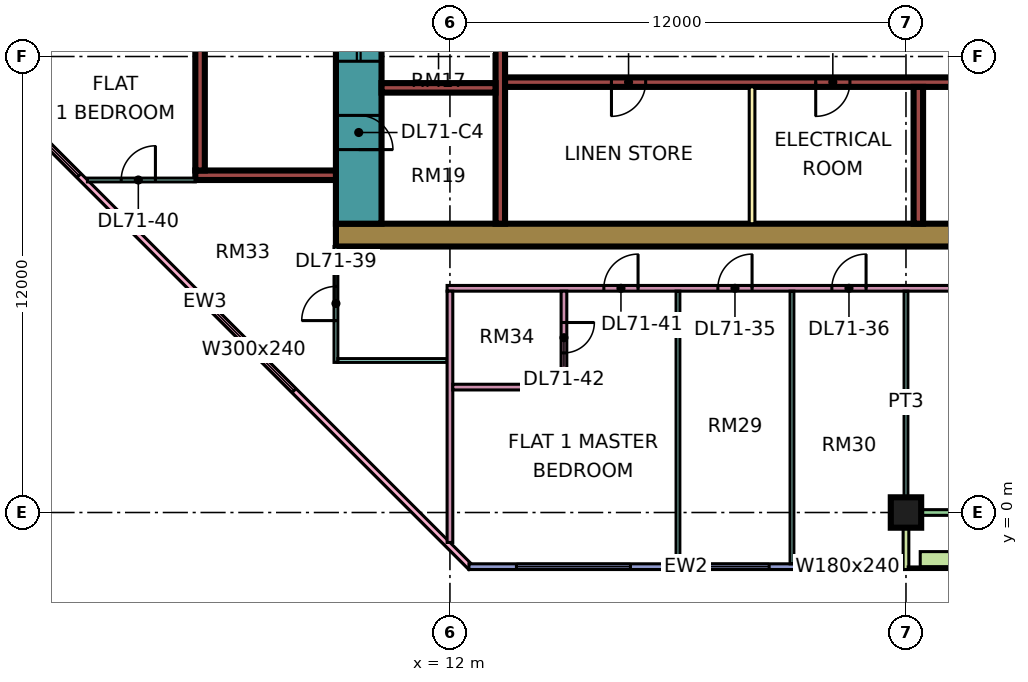
"""IFC4 building model, lengths in metres.
Left out: names, types, materials, properties, quantities, classifications, styles, units other than length and angle.
Written with IfcOpenShell. Run it as: python <this file> out.ifc"""

import sys

from ifc_helpers import new_model, si_unit, direction, frame, frame_2d, origin, origin_2d, place, context, subcontext, project, spatial, rectangle, extrude, element, fill, save


model = new_model("IFC4")
c1 = context("Model", 3, precision=1e-05, world=origin(), true_north=direction((0.0, 1.0)))
c2 = subcontext(c1, "Body", "Model", "MODEL_VIEW")
j1 = project(units=[si_unit("LENGTHUNIT", "METRE"), si_unit("PLANEANGLEUNIT", "RADIAN")], contexts=[c1])
p1 = place(None, origin())
s1 = spatial("IfcSite", under=j1, at=p1, CompositionType="ELEMENT")
p2 = place(p1, origin())
s2 = spatial("IfcBuilding", under=s1, at=p2, CompositionType="ELEMENT")
p3 = place(p2, frame((0.0, 0.0, 303.4)))
s3 = spatial("IfcBuildingStorey", under=s2, at=p3, CompositionType="ELEMENT", Elevation=303.4)
p4 = place(p3, frame((24.0, 0.0, 0.0), z_axis=(0.0, 0.0, 1.0), x_axis=(1.0, 0.0, 0.0)))
e1 = element("IfcColumn", 1, at=p4, inside=s3, PredefinedType="COLUMN", context=c2, shape_type="SweptSolid", body=[
    extrude(rectangle(XDim=0.8, YDim=0.8, at=origin_2d()), origin(), (0.0, 0.0, 1.0), 3.75),
])
p5 = place(p3, frame((9.0, 7.3, 0.0), z_axis=(0.0, 0.0, 1.0), x_axis=(1.0, 0.0, 0.0)))
e2 = element("IfcWall", 2, at=p5, inside=s3, PredefinedType="SHEAR", context=c2, shape_type="SweptSolid", body=[
    extrude(rectangle(XDim=25.0, YDim=0.6, at=frame_2d((12.5, 0.0))), origin(), (0.0, 0.0, 1.0), 3.75),
])
p6 = place(p3, frame((9.6, 7.6, 0.0), z_axis=(0.0, 0.0, 1.0), x_axis=(0.0, 1.0, 0.0)))
e3 = element("IfcWall", 3, at=p6, inside=s3, PredefinedType="SHEAR", context=c2, shape_type="SweptSolid", body=[
    extrude(rectangle(XDim=11.8, YDim=1.2, at=frame_2d((5.9, 0.0))), origin(), (0.0, 0.0, 1.0), 3.75),
])
p7 = place(p6, frame((4.275, 0.0, 0.0)))
e4 = element("IfcOpeningElement", 4, at=p7, cuts=e3, PredefinedType="OPENING", context=c2, shape_type="SweptSolid", body=[
    extrude(rectangle(XDim=1.1, YDim=2.2, at=frame_2d((0.55, 1.1))), frame((0.0, 0.61, 0.0), z_axis=(0.0, -1.0, 0.0), x_axis=(1.0, 0.0, 0.0)), (0.0, 0.0, 1.0), 1.22),
])
p8 = place(p6, frame((6.775, 0.0, 0.0)))
e5 = element("IfcOpeningElement", 5, at=p8, cuts=e3, PredefinedType="OPENING", context=c2, shape_type="SweptSolid", body=[
    extrude(rectangle(XDim=1.1, YDim=2.2, at=frame_2d((0.55, 1.1))), frame((0.0, 0.61, 0.0), z_axis=(0.0, -1.0, 0.0), x_axis=(1.0, 0.0, 0.0)), (0.0, 0.0, 1.0), 1.22),
])
p9 = place(p6, frame((9.7, 0.0, 0.0)))
e6 = element("IfcOpeningElement", 6, at=p9, cuts=e3, PredefinedType="OPENING", context=c2, shape_type="SweptSolid", body=[
    extrude(rectangle(XDim=1.1, YDim=2.2, at=frame_2d((0.55, 1.1))), frame((0.0, 0.61, 0.0), z_axis=(0.0, -1.0, 0.0), x_axis=(1.0, 0.0, 0.0)), (0.0, 0.0, 1.0), 1.22),
])
p10 = place(p6, frame((1.95, 0.0, 0.0)))
e7 = element("IfcOpeningElement", 7, at=p10, cuts=e3, PredefinedType="OPENING", context=c2, shape_type="SweptSolid", body=[
    extrude(rectangle(XDim=0.9, YDim=2.1, at=frame_2d((0.45, 1.05))), frame((0.0, 0.61, 0.0), z_axis=(0.0, -1.0, 0.0), x_axis=(1.0, 0.0, 0.0)), (0.0, 0.0, 1.0), 1.22),
])
p11 = place(p3, frame((13.325, 7.6, 0.0), z_axis=(0.0, 0.0, 1.0), x_axis=(0.0, 1.0, 0.0)))
e8 = element("IfcWall", 8, at=p11, inside=s3, PredefinedType="SHEAR", context=c2, shape_type="SweptSolid", body=[
    extrude(rectangle(XDim=11.8, YDim=0.25, at=frame_2d((5.9, 0.0))), origin(), (0.0, 0.0, 1.0), 3.75),
])
p12 = place(p3, frame((13.45, 11.325, 0.0), z_axis=(0.0, 0.0, 1.0), x_axis=(1.0, 0.0, 0.0)))
e9 = element("IfcWall", 9, at=p12, inside=s3, PredefinedType="SHEAR", context=c2, shape_type="SweptSolid", body=[
    extrude(rectangle(XDim=19.95, YDim=0.25, at=frame_2d((9.975, 0.0))), origin(), (0.0, 0.0, 1.0), 3.75),
])
p13 = place(p12, frame((2.8, 0.0, 0.0)))
e10 = element("IfcOpeningElement", 10, at=p13, cuts=e9, PredefinedType="OPENING", context=c2, shape_type="SweptSolid", body=[
    extrude(rectangle(XDim=0.9, YDim=2.1, at=frame_2d((0.45, 1.05))), frame((0.0, 0.135, 0.0), z_axis=(0.0, -1.0, 0.0), x_axis=(1.0, 0.0, 0.0)), (0.0, 0.0, 1.0), 0.27),
])
p14 = place(p12, frame((8.175, 0.0, 0.0)))
e11 = element("IfcOpeningElement", 11, at=p14, cuts=e9, PredefinedType="OPENING", context=c2, shape_type="SweptSolid", body=[
    extrude(rectangle(XDim=0.9, YDim=2.1, at=frame_2d((0.45, 1.05))), frame((0.0, 0.135, 0.0), z_axis=(0.0, -1.0, 0.0), x_axis=(1.0, 0.0, 0.0)), (0.0, 0.0, 1.0), 0.27),
])
p15 = place(p12, frame((13.175, 0.0, 0.0)))
e12 = element("IfcOpeningElement", 12, at=p15, cuts=e9, PredefinedType="OPENING", context=c2, shape_type="SweptSolid", body=[
    extrude(rectangle(XDim=0.9, YDim=2.1, at=frame_2d((0.45, 1.05))), frame((0.0, 0.135, 0.0), z_axis=(0.0, -1.0, 0.0), x_axis=(1.0, 0.0, 0.0)), (0.0, 0.0, 1.0), 0.27),
])
p16 = place(p12, frame((17.65, 0.0, 0.0)))
e13 = element("IfcOpeningElement", 13, at=p16, cuts=e9, PredefinedType="OPENING", context=c2, shape_type="SweptSolid", body=[
    extrude(rectangle(XDim=0.9, YDim=2.1, at=frame_2d((0.45, 1.05))), frame((0.0, 0.135, 0.0), z_axis=(0.0, -1.0, 0.0), x_axis=(1.0, 0.0, 0.0)), (0.0, 0.0, 1.0), 0.27),
])
p17 = place(p3, frame((10.2, 11.175, 0.0), z_axis=(0.0, 0.0, 1.0), x_axis=(1.0, 0.0, 0.0)))
e14 = element("IfcWall", 14, at=p17, inside=s3, PredefinedType="SHEAR", context=c2, shape_type="SweptSolid", body=[
    extrude(rectangle(XDim=3.0, YDim=0.25, at=frame_2d((1.5, 0.0))), origin(), (0.0, 0.0, 1.0), 3.75),
])
p18 = place(p3, frame((24.325, 7.6, 0.0), z_axis=(0.0, 0.0, 1.0), x_axis=(0.0, 1.0, 0.0)))
e15 = element("IfcWall", 15, at=p18, inside=s3, PredefinedType="SHEAR", context=c2, shape_type="SweptSolid", body=[
    extrude(rectangle(XDim=3.6, YDim=0.25, at=frame_2d((1.8, 0.0))), origin(), (0.0, 0.0, 1.0), 3.75),
])
p19 = place(p3, frame((5.3, 8.875, 0.0), z_axis=(0.0, 0.0, 1.0), x_axis=(1.0, 0.0, 0.0)))
e16 = element("IfcWall", 16, at=p19, inside=s3, PredefinedType="SHEAR", context=c2, shape_type="SweptSolid", body=[
    extrude(rectangle(XDim=3.7, YDim=0.25, at=frame_2d((1.85, 0.0))), origin(), (0.0, 0.0, 1.0), 3.75),
])
p20 = place(p3, frame((5.425, 9.0, 0.0), z_axis=(0.0, 0.0, 1.0), x_axis=(0.0, 1.0, 0.0)))
e17 = element("IfcWall", 17, at=p20, inside=s3, PredefinedType="SHEAR", context=c2, shape_type="SweptSolid", body=[
    extrude(rectangle(XDim=4.0, YDim=0.25, at=frame_2d((2.0, 0.0))), origin(), (0.0, 0.0, 1.0), 3.75),
])
p21 = place(p3, frame((-1.447, 12.553, 0.0), z_axis=(0.0, 0.0, 1.0), x_axis=(0.707106781187, -0.707106781187, 0.0)))
e18 = element("IfcWall", 18, at=p21, inside=s3, PredefinedType="SOLIDWALL", context=c2, shape_type="SweptSolid", body=[
    extrude(rectangle(XDim=19.799, YDim=0.15, at=frame_2d((9.899, 0.0))), origin(), (0.0, 0.0, 1.0), 3.35),
])
p22 = place(p21, frame((2.212, 0.0, 0.45)))
e19 = element("IfcOpeningElement", 19, at=p22, cuts=e18, PredefinedType="OPENING", context=c2, shape_type="SweptSolid", body=[
    extrude(rectangle(XDim=3.0, YDim=2.4, at=frame_2d((1.5, 1.2))), frame((0.0, 0.085, 0.0), z_axis=(0.0, -1.0, 0.0), x_axis=(1.0, 0.0, 0.0)), (0.0, 0.0, 1.0), 0.17),
])
p23 = place(p21, frame((10.216, 0.0, 0.45)))
e20 = element("IfcOpeningElement", 20, at=p23, cuts=e18, PredefinedType="OPENING", context=c2, shape_type="SweptSolid", body=[
    extrude(rectangle(XDim=3.0, YDim=2.4, at=frame_2d((1.5, 1.2))), frame((0.0, 0.085, 0.0), z_axis=(0.0, -1.0, 0.0), x_axis=(1.0, 0.0, 0.0)), (0.0, 0.0, 1.0), 0.17),
])
p24 = place(p3, frame((12.5, -1.425, 0.0), z_axis=(0.0, 0.0, 1.0), x_axis=(1.0, 0.0, 0.0)))
e21 = element("IfcWall", 21, at=p24, inside=s3, PredefinedType="SOLIDWALL", context=c2, shape_type="SweptSolid", body=[
    extrude(rectangle(XDim=11.425, YDim=0.15, at=frame_2d((5.712, 0.0))), origin(), (0.0, 0.0, 1.0), 3.35),
])
p25 = place(p24, frame((1.25, 0.0, 0.45)))
e22 = element("IfcOpeningElement", 22, at=p25, cuts=e21, PredefinedType="OPENING", context=c2, shape_type="SweptSolid", body=[
    extrude(rectangle(XDim=3.0, YDim=2.4, at=frame_2d((1.5, 1.2))), frame((0.0, 0.085, 0.0), z_axis=(0.0, -1.0, 0.0), x_axis=(1.0, 0.0, 0.0)), (0.0, 0.0, 1.0), 0.17),
])
p26 = place(p24, frame((6.1, 0.0, 0.45)))
e23 = element("IfcOpeningElement", 23, at=p26, cuts=e21, PredefinedType="OPENING", context=c2, shape_type="SweptSolid", body=[
    extrude(rectangle(XDim=1.8, YDim=2.4, at=frame_2d((0.9, 1.2))), frame((0.0, 0.085, 0.0), z_axis=(0.0, -1.0, 0.0), x_axis=(1.0, 0.0, 0.0)), (0.0, 0.0, 1.0), 0.17),
])
p27 = place(p24, frame((9.062, 0.0, 0.45)))
e24 = element("IfcOpeningElement", 24, at=p27, cuts=e21, PredefinedType="OPENING", context=c2, shape_type="SweptSolid", body=[
    extrude(rectangle(XDim=1.8, YDim=2.4, at=frame_2d((0.9, 1.2))), frame((0.0, 0.085, 0.0), z_axis=(0.0, -1.0, 0.0), x_axis=(1.0, 0.0, 0.0)), (0.0, 0.0, 1.0), 0.17),
])
p28 = place(p3, frame((24.075, 0.0, 0.0), z_axis=(0.0, 0.0, 1.0), x_axis=(1.0, 0.0, 0.0)))
e25 = element("IfcWall", 25, at=p28, inside=s3, PredefinedType="SOLIDWALL", context=c2, shape_type="SweptSolid", body=[
    extrude(rectangle(XDim=11.85, YDim=0.15, at=frame_2d((5.925, 0.0))), origin(), (0.0, 0.0, 1.0), 3.35),
])
p29 = place(p28, frame((3.775, 0.0, 0.0)))
e26 = element("IfcOpeningElement", 26, at=p29, cuts=e25, PredefinedType="OPENING", context=c2, shape_type="SweptSolid", body=[
    extrude(rectangle(XDim=1.8, YDim=2.4, at=frame_2d((0.9, 1.2))), frame((0.0, 0.085, 0.0), z_axis=(0.0, -1.0, 0.0), x_axis=(1.0, 0.0, 0.0)), (0.0, 0.0, 1.0), 0.17),
])
p30 = place(p28, frame((9.275, 0.0, 0.45)))
e27 = element("IfcOpeningElement", 27, at=p30, cuts=e25, PredefinedType="OPENING", context=c2, shape_type="SweptSolid", body=[
    extrude(rectangle(XDim=1.8, YDim=2.4, at=frame_2d((0.9, 1.2))), frame((0.0, 0.085, 0.0), z_axis=(0.0, -1.0, 0.0), x_axis=(1.0, 0.0, 0.0)), (0.0, 0.0, 1.0), 0.17),
])
p31 = place(p3, frame((24.0, -1.5, 0.0), z_axis=(0.0, 0.0, 1.0), x_axis=(0.0, 1.0, 0.0)))
e28 = element("IfcWall", 28, at=p31, inside=s3, PredefinedType="SOLIDWALL", context=c2, shape_type="SweptSolid", body=[
    extrude(rectangle(XDim=1.5, YDim=0.15, at=frame_2d((0.75, 0.0))), origin(), (0.0, 0.0, 1.0), 3.35),
])
p32 = place(p3, frame((24.375, -1.229, 0.0), z_axis=(0.0, 0.0, 1.0), x_axis=(1.0, 0.0, 0.0)))
e29 = element("IfcWall", 29, at=p32, inside=s3, PredefinedType="SOLIDWALL", context=c2, shape_type="SweptSolid", body=[
    extrude(rectangle(XDim=11.25, YDim=0.4, at=frame_2d((5.625, 0.0))), origin(), (0.0, 0.0, 1.0), 0.7),
])
p33 = place(p3, frame((19.95, 7.6, 0.0), z_axis=(0.0, 0.0, 1.0), x_axis=(0.0, 1.0, 0.0)))
e30 = element("IfcWall", 30, at=p33, inside=s3, PredefinedType="PARTITIONING", context=c2, shape_type="SweptSolid", body=[
    extrude(rectangle(XDim=3.6, YDim=0.15, at=frame_2d((1.8, 0.0))), origin(), (0.0, 0.0, 1.0), 3.35),
])
p34 = place(p3, frame((2.461, 8.75, 0.0), z_axis=(0.0, 0.0, 1.0), x_axis=(1.0, 0.0, 0.0)))
e31 = element("IfcWall", 31, at=p34, inside=s3, PredefinedType="PARTITIONING", context=c2, shape_type="SweptSolid", body=[
    extrude(rectangle(XDim=2.839, YDim=0.1, at=frame_2d((1.419, 0.0))), origin(), (0.0, 0.0, 1.0), 3.35),
])
p35 = place(p34, frame((0.889, 0.0, 0.0)))
e32 = element("IfcOpeningElement", 32, at=p35, cuts=e31, PredefinedType="OPENING", context=c2, shape_type="SweptSolid", body=[
    extrude(rectangle(XDim=0.9, YDim=2.1, at=frame_2d((0.45, 1.05))), frame((0.0, 0.06, 0.0), z_axis=(0.0, -1.0, 0.0), x_axis=(1.0, 0.0, 0.0)), (0.0, 0.0, 1.0), 0.12),
])
p36 = place(p3, frame((9.0, 3.95, 0.0), z_axis=(0.0, 0.0, 1.0), x_axis=(0.0, 1.0, 0.0)))
e33 = element("IfcWall", 33, at=p36, inside=s3, PredefinedType="PARTITIONING", context=c2, shape_type="SweptSolid", body=[
    extrude(rectangle(XDim=3.05, YDim=0.1, at=frame_2d((1.525, 0.0))), origin(), (0.0, 0.0, 1.0), 3.35),
])
p37 = place(p36, frame((1.1, 0.0, 0.0)))
e34 = element("IfcOpeningElement", 34, at=p37, cuts=e33, PredefinedType="OPENING", context=c2, shape_type="SweptSolid", body=[
    extrude(rectangle(XDim=0.9, YDim=2.1, at=frame_2d((0.45, 1.05))), frame((0.0, 0.06, 0.0), z_axis=(0.0, -1.0, 0.0), x_axis=(1.0, 0.0, 0.0)), (0.0, 0.0, 1.0), 0.12),
])
p38 = place(p3, frame((9.05, 4.0, 0.0), z_axis=(0.0, 0.0, 1.0), x_axis=(1.0, 0.0, 0.0)))
e35 = element("IfcWall", 35, at=p38, inside=s3, PredefinedType="PARTITIONING", context=c2, shape_type="SweptSolid", body=[
    extrude(rectangle(XDim=2.875, YDim=0.1, at=frame_2d((1.438, 0.0))), origin(), (0.0, 0.0, 1.0), 3.35),
])
p39 = place(p3, frame((11.925, 5.9, 0.0), z_axis=(0.0, 0.0, 1.0), x_axis=(1.0, 0.0, 0.0)))
e36 = element("IfcWall", 36, at=p39, inside=s3, PredefinedType="PARTITIONING", context=c2, shape_type="SweptSolid", body=[
    extrude(rectangle(XDim=21.125, YDim=0.15, at=frame_2d((10.562, 0.0))), origin(), (0.0, 0.0, 1.0), 3.35),
])
p40 = place(p39, frame((7.125, 0.0, 0.0)))
e37 = element("IfcOpeningElement", 37, at=p40, cuts=e36, PredefinedType="OPENING", context=c2, shape_type="SweptSolid", body=[
    extrude(rectangle(XDim=0.9, YDim=2.1, at=frame_2d((0.45, 1.05))), frame((0.0, 0.085, 0.0), z_axis=(0.0, -1.0, 0.0), x_axis=(1.0, 0.0, 0.0)), (0.0, 0.0, 1.0), 0.17),
])
p41 = place(p39, frame((10.125, 0.0, 0.0)))
e38 = element("IfcOpeningElement", 38, at=p41, cuts=e36, PredefinedType="OPENING", context=c2, shape_type="SweptSolid", body=[
    extrude(rectangle(XDim=0.9, YDim=2.1, at=frame_2d((0.45, 1.05))), frame((0.0, 0.085, 0.0), z_axis=(0.0, -1.0, 0.0), x_axis=(1.0, 0.0, 0.0)), (0.0, 0.0, 1.0), 0.17),
])
p42 = place(p39, frame((4.125, 0.0, 0.0)))
e39 = element("IfcOpeningElement", 39, at=p42, cuts=e36, PredefinedType="OPENING", context=c2, shape_type="SweptSolid", body=[
    extrude(rectangle(XDim=0.9, YDim=2.1, at=frame_2d((0.45, 1.05))), frame((0.0, 0.085, 0.0), z_axis=(0.0, -1.0, 0.0), x_axis=(1.0, 0.0, 0.0)), (0.0, 0.0, 1.0), 0.17),
])
p43 = place(p39, frame((16.125, 0.0, 0.0)))
e40 = element("IfcOpeningElement", 40, at=p43, cuts=e36, PredefinedType="OPENING", context=c2, shape_type="SweptSolid", body=[
    extrude(rectangle(XDim=0.9, YDim=2.1, at=frame_2d((0.45, 1.05))), frame((0.0, 0.085, 0.0), z_axis=(0.0, -1.0, 0.0), x_axis=(1.0, 0.0, 0.0)), (0.0, 0.0, 1.0), 0.17),
])
p44 = place(p3, frame((12.0, -0.788, 0.0), z_axis=(0.0, 0.0, 1.0), x_axis=(0.0, 1.0, 0.0)))
e41 = element("IfcWall", 41, at=p44, inside=s3, PredefinedType="PARTITIONING", context=c2, shape_type="SweptSolid", body=[
    extrude(rectangle(XDim=6.613, YDim=0.15, at=frame_2d((3.306, 0.0))), origin(), (0.0, 0.0, 1.0), 3.35),
])
p45 = place(p3, frame((12.075, 3.3, 0.0), z_axis=(0.0, 0.0, 1.0), x_axis=(1.0, 0.0, 0.0)))
e42 = element("IfcWall", 42, at=p45, inside=s3, PredefinedType="PARTITIONING", context=c2, shape_type="SweptSolid", body=[
    extrude(rectangle(XDim=3.0, YDim=0.15, at=frame_2d((1.5, 0.0))), origin(), (0.0, 0.0, 1.0), 3.35),
])
p46 = place(p3, frame((15.0, 3.375, 0.0), z_axis=(0.0, 0.0, 1.0), x_axis=(0.0, 1.0, 0.0)))
e43 = element("IfcWall", 43, at=p46, inside=s3, PredefinedType="PARTITIONING", context=c2, shape_type="SweptSolid", body=[
    extrude(rectangle(XDim=2.45, YDim=0.15, at=frame_2d((1.225, 0.0))), origin(), (0.0, 0.0, 1.0), 3.35),
])
p47 = place(p46, frame((0.825, 0.0, 0.0)))
e44 = element("IfcOpeningElement", 44, at=p47, cuts=e43, PredefinedType="OPENING", context=c2, shape_type="SweptSolid", body=[
    extrude(rectangle(XDim=0.8, YDim=2.1, at=frame_2d((0.4, 1.05))), frame((0.0, 0.085, 0.0), z_axis=(0.0, -1.0, 0.0), x_axis=(1.0, 0.0, 0.0)), (0.0, 0.0, 1.0), 0.17),
])
for number, where, z_axis, x_axis in (
    (45, (18.0, -1.351, 0.0), (0.0, 0.0, 1.0), (0.0, 1.0, 0.0)),
    (46, (21.0, -1.351, 0.0), (0.0, 0.0, 1.0), (0.0, 1.0, 0.0)),
):
    element("IfcWall", number, at=place(p3, frame(where, z_axis=z_axis, x_axis=x_axis)), inside=s3, PredefinedType="PARTITIONING", context=c2, shape_type="SweptSolid", body=[
        extrude(rectangle(XDim=7.176, YDim=0.1, at=frame_2d((3.588, 0.0))), origin(), (0.0, 0.0, 1.0), 3.35),
    ])
p48 = place(p3, frame((24.0, 0.0, 0.0), z_axis=(0.0, 0.0, 1.0), x_axis=(0.0, 1.0, 0.0)))
e47 = element("IfcWall", 47, at=p48, inside=s3, PredefinedType="PARTITIONING", context=c2, shape_type="SweptSolid", body=[
    extrude(rectangle(XDim=5.825, YDim=0.1, at=frame_2d((2.913, 0.0))), origin(), (0.0, 0.0, 1.0), 3.35),
])
p49 = place(p22, origin())
e48 = element("IfcWindow", 48, at=p49, inside=s3, PartitioningType="SINGLE_PANEL", PredefinedType="WINDOW", context=c2, shape_type="SweptSolid", body=[
    extrude(rectangle(XDim=3.0, YDim=2.4, at=frame_2d((1.5, 1.2))), frame((0.0, 0.03, 0.0), z_axis=(0.0, -1.0, 0.0), x_axis=(1.0, 0.0, 0.0)), (0.0, 0.0, 1.0), 0.06),
])
fill(e19, e48)
p50 = place(p23, origin())
e49 = element("IfcWindow", 49, at=p50, inside=s3, PartitioningType="SINGLE_PANEL", PredefinedType="WINDOW", context=c2, shape_type="SweptSolid", body=[
    extrude(rectangle(XDim=3.0, YDim=2.4, at=frame_2d((1.5, 1.2))), frame((0.0, 0.03, 0.0), z_axis=(0.0, -1.0, 0.0), x_axis=(1.0, 0.0, 0.0)), (0.0, 0.0, 1.0), 0.06),
])
fill(e20, e49)
p51 = place(p25, origin())
e50 = element("IfcWindow", 50, at=p51, inside=s3, PartitioningType="SINGLE_PANEL", PredefinedType="WINDOW", context=c2, shape_type="SweptSolid", body=[
    extrude(rectangle(XDim=3.0, YDim=2.4, at=frame_2d((1.5, 1.2))), frame((0.0, 0.03, 0.0), z_axis=(0.0, -1.0, 0.0), x_axis=(1.0, 0.0, 0.0)), (0.0, 0.0, 1.0), 0.06),
])
fill(e22, e50)
p52 = place(p26, origin())
e51 = element("IfcWindow", 51, at=p52, inside=s3, PartitioningType="SINGLE_PANEL", PredefinedType="WINDOW", context=c2, shape_type="SweptSolid", body=[
    extrude(rectangle(XDim=1.8, YDim=2.4, at=frame_2d((0.9, 1.2))), frame((0.0, 0.03, 0.0), z_axis=(0.0, -1.0, 0.0), x_axis=(1.0, 0.0, 0.0)), (0.0, 0.0, 1.0), 0.06),
])
fill(e23, e51)
p53 = place(p27, origin())
e52 = element("IfcWindow", 52, at=p53, inside=s3, PartitioningType="SINGLE_PANEL", PredefinedType="WINDOW", context=c2, shape_type="SweptSolid", body=[
    extrude(rectangle(XDim=1.8, YDim=2.4, at=frame_2d((0.9, 1.2))), frame((0.0, 0.03, 0.0), z_axis=(0.0, -1.0, 0.0), x_axis=(1.0, 0.0, 0.0)), (0.0, 0.0, 1.0), 0.06),
])
fill(e24, e52)
p54 = place(p7, origin())
e53 = element("IfcDoor", 53, at=p54, inside=s3, OperationType="DOUBLE_DOOR_SLIDING", PredefinedType="DOOR", context=c2, shape_type="SweptSolid", body=[
    extrude(rectangle(XDim=1.1, YDim=2.2, at=frame_2d((0.55, 1.1))), frame((0.0, 0.025, 0.0), z_axis=(0.0, -1.0, 0.0), x_axis=(1.0, 0.0, 0.0)), (0.0, 0.0, 1.0), 0.05),
])
fill(e4, e53)
p55 = place(p10, frame((0.9, 0.0, 0.0), z_axis=(0.0, 0.0, 1.0), x_axis=(-1.0, 0.0, 0.0)))
e54 = element("IfcDoor", 54, at=p55, inside=s3, OperationType="SINGLE_SWING_LEFT", PredefinedType="DOOR", context=c2, shape_type="SweptSolid", body=[
    extrude(rectangle(XDim=0.9, YDim=2.1, at=frame_2d((0.45, 1.05))), frame((0.0, 0.025, 0.0), z_axis=(0.0, -1.0, 0.0), x_axis=(1.0, 0.0, 0.0)), (0.0, 0.0, 1.0), 0.05),
])
fill(e7, e54)
p56 = place(p13, frame((0.9, 0.0, 0.0), z_axis=(0.0, 0.0, 1.0), x_axis=(-1.0, 0.0, 0.0)))
e55 = element("IfcDoor", 55, at=p56, inside=s3, OperationType="SINGLE_SWING_LEFT", PredefinedType="DOOR", context=c2, shape_type="SweptSolid", body=[
    extrude(rectangle(XDim=0.9, YDim=2.1, at=frame_2d((0.45, 1.05))), frame((0.0, 0.025, 0.0), z_axis=(0.0, -1.0, 0.0), x_axis=(1.0, 0.0, 0.0)), (0.0, 0.0, 1.0), 0.05),
])
fill(e10, e55)
p57 = place(p14, frame((0.9, 0.0, 0.0), z_axis=(0.0, 0.0, 1.0), x_axis=(-1.0, 0.0, 0.0)))
e56 = element("IfcDoor", 56, at=p57, inside=s3, OperationType="SINGLE_SWING_LEFT", PredefinedType="DOOR", context=c2, shape_type="SweptSolid", body=[
    extrude(rectangle(XDim=0.9, YDim=2.1, at=frame_2d((0.45, 1.05))), frame((0.0, 0.025, 0.0), z_axis=(0.0, -1.0, 0.0), x_axis=(1.0, 0.0, 0.0)), (0.0, 0.0, 1.0), 0.05),
])
fill(e11, e56)
p58 = place(p40, frame((0.9, 0.0, 0.0), z_axis=(0.0, 0.0, 1.0), x_axis=(-1.0, 0.0, 0.0)))
e57 = element("IfcDoor", 57, at=p58, inside=s3, OperationType="SINGLE_SWING_RIGHT", PredefinedType="DOOR", context=c2, shape_type="SweptSolid", body=[
    extrude(rectangle(XDim=0.9, YDim=2.1, at=frame_2d((0.45, 1.05))), frame((0.0, 0.025, 0.0), z_axis=(0.0, -1.0, 0.0), x_axis=(1.0, 0.0, 0.0)), (0.0, 0.0, 1.0), 0.05),
])
fill(e37, e57)
p59 = place(p41, frame((0.9, 0.0, 0.0), z_axis=(0.0, 0.0, 1.0), x_axis=(-1.0, 0.0, 0.0)))
e58 = element("IfcDoor", 58, at=p59, inside=s3, OperationType="SINGLE_SWING_RIGHT", PredefinedType="DOOR", context=c2, shape_type="SweptSolid", body=[
    extrude(rectangle(XDim=0.9, YDim=2.1, at=frame_2d((0.45, 1.05))), frame((0.0, 0.025, 0.0), z_axis=(0.0, -1.0, 0.0), x_axis=(1.0, 0.0, 0.0)), (0.0, 0.0, 1.0), 0.05),
])
fill(e38, e58)
p60 = place(p37, origin())
e59 = element("IfcDoor", 59, at=p60, inside=s3, OperationType="SINGLE_SWING_LEFT", PredefinedType="DOOR", context=c2, shape_type="SweptSolid", body=[
    extrude(rectangle(XDim=0.9, YDim=2.1, at=frame_2d((0.45, 1.05))), frame((0.0, 0.025, 0.0), z_axis=(0.0, -1.0, 0.0), x_axis=(1.0, 0.0, 0.0)), (0.0, 0.0, 1.0), 0.05),
])
fill(e34, e59)
p61 = place(p35, frame((0.9, 0.0, 0.0), z_axis=(0.0, 0.0, 1.0), x_axis=(-1.0, 0.0, 0.0)))
e60 = element("IfcDoor", 60, at=p61, inside=s3, OperationType="SINGLE_SWING_RIGHT", PredefinedType="DOOR", context=c2, shape_type="SweptSolid", body=[
    extrude(rectangle(XDim=0.9, YDim=2.1, at=frame_2d((0.45, 1.05))), frame((0.0, 0.025, 0.0), z_axis=(0.0, -1.0, 0.0), x_axis=(1.0, 0.0, 0.0)), (0.0, 0.0, 1.0), 0.05),
])
fill(e32, e60)
p62 = place(p42, frame((0.9, 0.0, 0.0), z_axis=(0.0, 0.0, 1.0), x_axis=(-1.0, 0.0, 0.0)))
e61 = element("IfcDoor", 61, at=p62, inside=s3, OperationType="SINGLE_SWING_RIGHT", PredefinedType="DOOR", context=c2, shape_type="SweptSolid", body=[
    extrude(rectangle(XDim=0.9, YDim=2.1, at=frame_2d((0.45, 1.05))), frame((0.0, 0.025, 0.0), z_axis=(0.0, -1.0, 0.0), x_axis=(1.0, 0.0, 0.0)), (0.0, 0.0, 1.0), 0.05),
])
fill(e39, e61)
p63 = place(p47, origin())
e62 = element("IfcDoor", 62, at=p63, inside=s3, OperationType="SINGLE_SWING_RIGHT", PredefinedType="DOOR", context=c2, shape_type="SweptSolid", body=[
    extrude(rectangle(XDim=0.8, YDim=2.1, at=frame_2d((0.4, 1.05))), frame((0.0, 0.025, 0.0), z_axis=(0.0, -1.0, 0.0), x_axis=(1.0, 0.0, 0.0)), (0.0, 0.0, 1.0), 0.05),
])
fill(e44, e62)
save(model, sys.argv[1])
